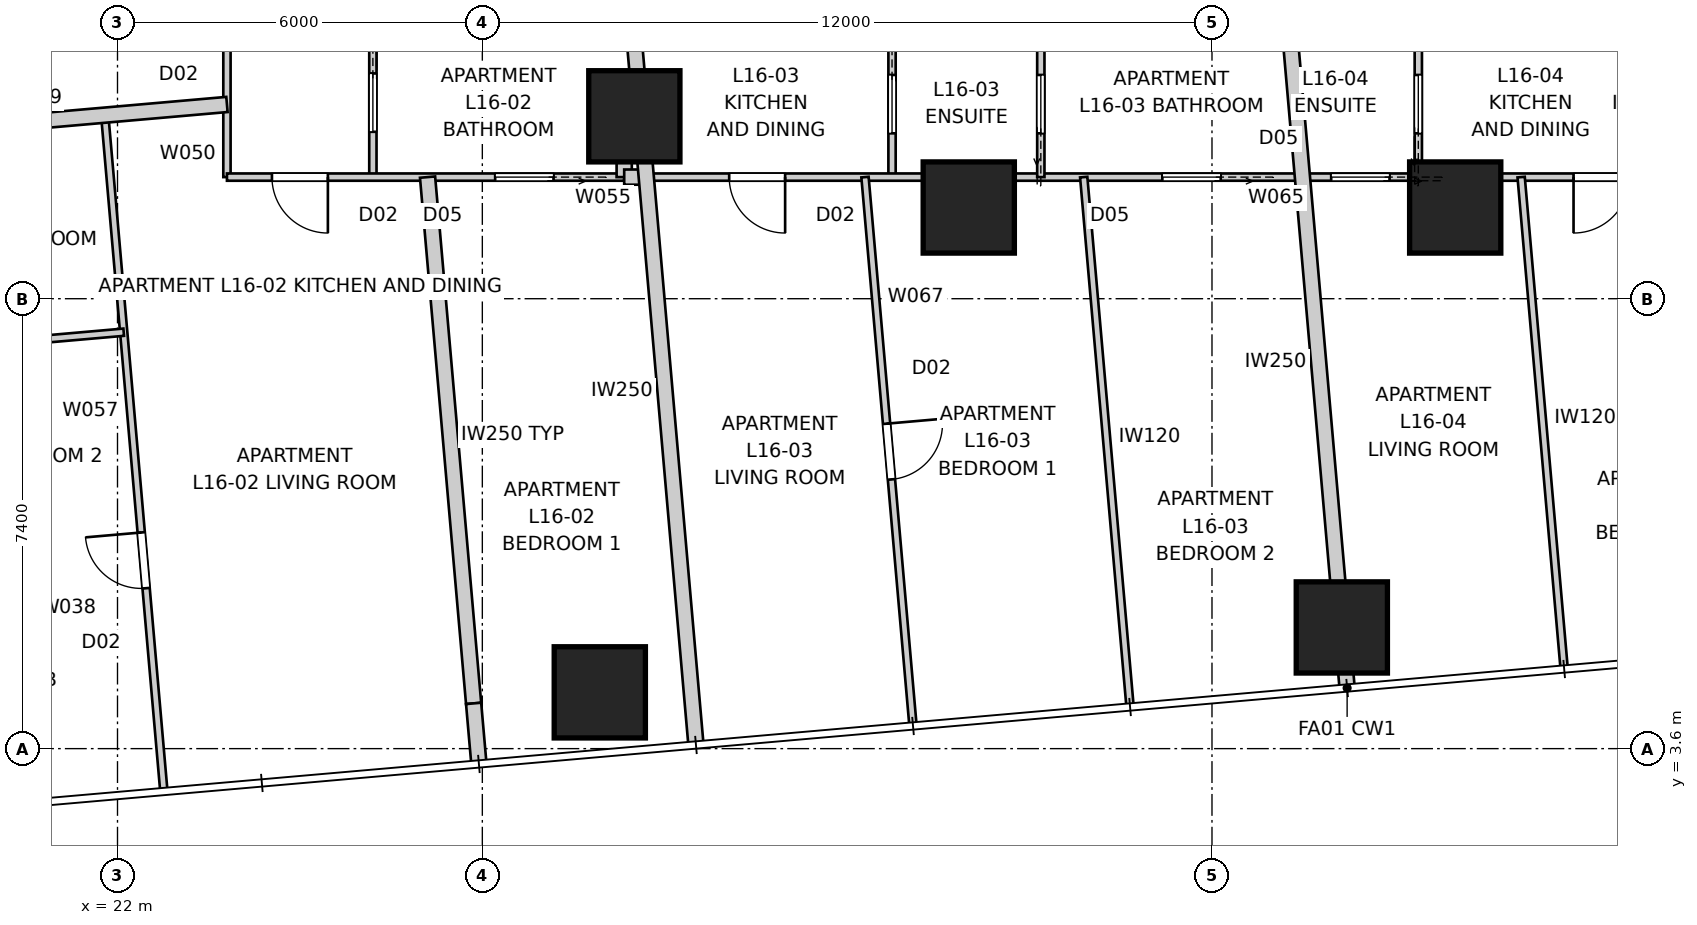
"""IFC4 building model, lengths in metres.
Left out: names, types, materials, properties, quantities, classifications, styles, units other than length and angle.
Written with IfcOpenShell. Run it as: python <this file> out.ifc"""

import sys

from ifc_helpers import new_model, si_unit, direction, frame, frame_2d, origin, origin_2d, place, context, subcontext, project, spatial, rectangle, extrude, element, fill, save


model = new_model("IFC4")
c1 = context("Model", 3, precision=1e-05, world=origin(), true_north=direction((0.0, 1.0)))
c2 = subcontext(c1, "Body", "Model", "MODEL_VIEW")
j1 = project(units=[si_unit("LENGTHUNIT", "METRE"), si_unit("PLANEANGLEUNIT", "RADIAN")], contexts=[c1])
p1 = place(None, origin())
s1 = spatial("IfcSite", under=j1, at=p1, CompositionType="ELEMENT")
p2 = place(p1, origin())
s2 = spatial("IfcBuilding", under=s1, at=p2, CompositionType="ELEMENT")
p3 = place(p2, frame((0.0, 0.0, 60.8)))
s3 = spatial("IfcBuildingStorey", under=s2, at=p3, CompositionType="ELEMENT", Elevation=60.8)
for number, where, z_axis, x_axis in (
    (1, (29.932, 4.526, 0.0), (0.0, 0.0, 1.0), (1.0, 0.0, 0.0)),
    (2, (42.135, 5.593, 0.0), (0.0, 0.0, 1.0), (1.0, 0.0, 0.0)),
    (3, (30.5, 14.0, 0.0), (0.0, 0.0, 1.0), (1.0, 0.0, 0.0)),
    (4, (36.0, 12.5, 0.0), (0.0, 0.0, 1.0), (1.0, 0.0, 0.0)),
    (5, (44.0, 12.5, 0.0), (0.0, 0.0, 1.0), (1.0, 0.0, 0.0)),
):
    element("IfcColumn", number, at=place(p3, frame(where, z_axis=z_axis, x_axis=x_axis)), inside=s3, PredefinedType="COLUMN", context=c2, shape_type="SweptSolid", body=[
        extrude(rectangle(XDim=1.5, YDim=1.5, at=origin_2d()), origin(), (0.0, 0.0, 1.0), 3.4),
    ])
p4 = place(p3, frame((42.222, 4.597, 0.0), z_axis=(0.0, 0.0, 1.0), x_axis=(-0.087140211333, 0.996196056792, 0.0)))
e6 = element("IfcWall", 6, at=p4, inside=s3, PredefinedType="PARTITIONING", context=c2, shape_type="SweptSolid", body=[
    extrude(rectangle(XDim=10.873, YDim=0.25, at=frame_2d((5.437, 0.0))), origin(), (0.0, 0.0, 1.0), 3.25),
])
p5 = place(p3, frame((31.513, 3.66, 0.0), z_axis=(0.0, 0.0, 1.0), x_axis=(-0.087168232078, 0.996193605338, 0.0)))
e7 = element("IfcWall", 7, at=p5, inside=s3, PredefinedType="PARTITIONING", context=c2, shape_type="SweptSolid", body=[
    extrude(rectangle(XDim=11.814, YDim=0.25, at=frame_2d((5.907, 0.0))), origin(), (0.0, 0.0, 1.0), 3.25),
])
p6 = place(p3, frame((23.8, 13.0, 0.0), z_axis=(0.0, 0.0, 1.0), x_axis=(0.0, 1.0, 0.0)))
e8 = element("IfcWall", 8, at=p6, inside=s3, PredefinedType="PARTITIONING", context=c2, shape_type="SweptSolid", body=[
    extrude(rectangle(XDim=8.439, YDim=0.12, at=frame_2d((4.219, 0.0))), origin(), (0.0, 0.0, 1.0), 2.55),
])
p7 = place(p6, frame((2.508, 0.0, 0.0)))
e9 = element("IfcOpeningElement", 9, at=p7, cuts=e8, PredefinedType="OPENING", context=c2, shape_type="SweptSolid", body=[
    extrude(rectangle(XDim=0.92, YDim=2.34, at=frame_2d((0.46, 1.17))), frame((0.0, 0.07, 0.0), z_axis=(0.0, -1.0, 0.0), x_axis=(1.0, 0.0, 0.0)), (0.0, 0.0, 1.0), 0.14),
])
p8 = place(p6, frame((5.685, 0.0, 0.0)))
e10 = element("IfcOpeningElement", 10, at=p8, cuts=e8, PredefinedType="OPENING", context=c2, shape_type="SweptSolid", body=[
    extrude(rectangle(XDim=0.96, YDim=2.1, at=frame_2d((0.48, 1.05))), frame((0.0, 0.07, 0.0), z_axis=(0.0, -1.0, 0.0), x_axis=(1.0, 0.0, 0.0)), (0.0, 0.0, 1.0), 0.14),
])
p9 = place(p3, frame((26.2, 15.45, 0.0), z_axis=(0.0, 0.0, 1.0), x_axis=(0.0, -1.0, 0.0)))
e11 = element("IfcWall", 11, at=p9, inside=s3, PredefinedType="PARTITIONING", context=c2, shape_type="SweptSolid", body=[
    extrude(rectangle(XDim=2.45, YDim=0.12, at=frame_2d((1.225, 0.0))), origin(), (0.0, 0.0, 1.0), 3.25),
])
p10 = place(p9, frame((0.745, 0.0, 0.0)))
e12 = element("IfcOpeningElement", 12, at=p10, cuts=e11, PredefinedType="OPENING", context=c2, shape_type="SweptSolid", body=[
    extrude(rectangle(XDim=0.96, YDim=2.1, at=frame_2d((0.48, 1.05))), frame((0.0, 0.07, 0.0), z_axis=(0.0, -1.0, 0.0), x_axis=(1.0, 0.0, 0.0)), (0.0, 0.0, 1.0), 0.14),
])
p11 = place(p3, frame((30.333, 13.0, 0.0), z_axis=(0.0, 0.0, 1.0), x_axis=(-1.0, 0.0, 0.0)))
e13 = element("IfcWall", 13, at=p11, inside=s3, PredefinedType="PARTITIONING", context=c2, shape_type="SweptSolid", body=[
    extrude(rectangle(XDim=6.533, YDim=0.12, at=frame_2d((3.267, 0.0))), origin(), (0.0, 0.0, 1.0), 3.25),
])
p12 = place(p11, frame((4.873, 0.0, 0.0)))
e14 = element("IfcOpeningElement", 14, at=p12, cuts=e13, PredefinedType="OPENING", context=c2, shape_type="SweptSolid", body=[
    extrude(rectangle(XDim=0.92, YDim=2.34, at=frame_2d((0.46, 1.17))), frame((0.0, 0.07, 0.0), z_axis=(0.0, -1.0, 0.0), x_axis=(1.0, 0.0, 0.0)), (0.0, 0.0, 1.0), 0.14),
])
p13 = place(p11, frame((1.162, 0.0, 0.0)))
e15 = element("IfcOpeningElement", 15, at=p13, cuts=e13, PredefinedType="OPENING", context=c2, shape_type="SweptSolid", body=[
    extrude(rectangle(XDim=0.96, YDim=2.1, at=frame_2d((0.48, 1.05))), frame((0.0, 0.07, 0.0), z_axis=(0.0, -1.0, 0.0), x_axis=(1.0, 0.0, 0.0)), (0.0, 0.0, 1.0), 0.14),
])
p14 = place(p3, frame((30.333, 14.396, 0.0), z_axis=(0.0, 0.0, 1.0), x_axis=(0.0, -1.0, 0.0)))
e16 = element("IfcWall", 16, at=p14, inside=s3, PredefinedType="PARTITIONING", context=c2, shape_type="SweptSolid", body=[
    extrude(rectangle(XDim=1.396, YDim=0.25, at=frame_2d((0.698, 0.0))), origin(), (0.0, 0.0, 1.0), 3.25),
])
p15 = place(p3, frame((22.759, 2.934, 0.0), z_axis=(0.0, 0.0, 1.0), x_axis=(-0.087130477128, 0.996196908224, 0.0)))
e17 = element("IfcWall", 17, at=p15, inside=s3, PredefinedType="PARTITIONING", context=c2, shape_type="SweptSolid", body=[
    extrude(rectangle(XDim=11.127, YDim=0.12, at=frame_2d((5.563, 0.0))), origin(), (0.0, 0.0, 1.0), 3.25),
])
p16 = place(p15, frame((3.317, 0.0, 0.0)))
e18 = element("IfcOpeningElement", 18, at=p16, cuts=e17, PredefinedType="OPENING", context=c2, shape_type="SweptSolid", body=[
    extrude(rectangle(XDim=0.92, YDim=2.34, at=frame_2d((0.46, 1.17))), frame((0.0, 0.07, 0.0), z_axis=(0.0, -1.0, 0.0), x_axis=(1.0, 0.0, 0.0)), (0.0, 0.0, 1.0), 0.14),
])
p17 = place(p3, frame((16.843, 13.586, 0.0), z_axis=(0.0, 0.0, 1.0), x_axis=(0.996195462691, 0.087147002895, 0.0)))
e19 = element("IfcWall", 19, at=p17, inside=s3, PredefinedType="PARTITIONING", context=c2, shape_type="SweptSolid", body=[
    extrude(rectangle(XDim=6.984, YDim=0.25, at=frame_2d((3.492, 0.0))), origin(), (0.0, 0.0, 1.0), 2.638),
])
p18 = place(p17, frame((1.548, 0.0, 0.0)))
e20 = element("IfcOpeningElement", 20, at=p18, cuts=e19, PredefinedType="OPENING", context=c2, shape_type="SweptSolid", body=[
    extrude(rectangle(XDim=0.92, YDim=2.34, at=frame_2d((0.46, 1.17))), frame((0.0, 0.135, 0.0), z_axis=(0.0, -1.0, 0.0), x_axis=(1.0, 0.0, 0.0)), (0.0, 0.0, 1.0), 0.27),
])
p19 = place(p3, frame((27.099, 13.0, 0.0), z_axis=(0.0, 0.0, 1.0), x_axis=(0.087158236544, -0.99619447991, 0.0)))
e21 = element("IfcWall", 21, at=p19, inside=s3, PredefinedType="PARTITIONING", context=c2, shape_type="SweptSolid", body=[
    extrude(rectangle(XDim=8.689, YDim=0.25, at=frame_2d((4.344, 0.0))), origin(), (0.0, 0.0, 1.0), 2.638),
])
p20 = place(p3, frame((27.856, 4.344, 0.0), z_axis=(0.0, 0.0, 1.0), x_axis=(0.087233202944, -0.996187918168, 0.0)))
e22 = element("IfcWall", 22, at=p20, inside=s3, PredefinedType="PARTITIONING", context=c2, shape_type="SweptSolid", body=[
    extrude(rectangle(XDim=0.96, YDim=0.25, at=frame_2d((0.48, 0.0))), origin(), (0.0, 0.0, 1.0), 3.25),
])
p21 = place(p3, frame((30.333, 13.0, 0.0), z_axis=(0.0, 0.0, 1.0), x_axis=(1.0, 0.0, 0.0)))
e23 = element("IfcWall", 23, at=p21, inside=s3, PredefinedType="PARTITIONING", context=c2, shape_type="SweptSolid", body=[
    extrude(rectangle(XDim=0.363, YDim=0.25, at=frame_2d((0.182, 0.0))), origin(), (0.0, 0.0, 1.0), 3.25),
])
p22 = place(p3, frame((16.198, 9.933, 0.0), z_axis=(0.0, 0.0, 1.0), x_axis=(0.996196712973, 0.08713270948, 0.0)))
e24 = element("IfcWall", 24, at=p22, inside=s3, PredefinedType="PARTITIONING", context=c2, shape_type="SweptSolid", body=[
    extrude(rectangle(XDim=5.926, YDim=0.12, at=frame_2d((2.963, 0.0))), origin(), (0.0, 0.0, 1.0), 3.25),
])
p23 = place(p3, frame((34.738, 15.4, 0.0), z_axis=(0.0, 0.0, 1.0), x_axis=(0.0, -1.0, 0.0)))
e25 = element("IfcWall", 25, at=p23, inside=s3, PredefinedType="PARTITIONING", context=c2, shape_type="SweptSolid", body=[
    extrude(rectangle(XDim=2.4, YDim=0.12, at=frame_2d((1.2, 0.0))), origin(), (0.0, 0.0, 1.0), 3.25),
])
p24 = place(p23, frame((0.72, 0.0, 0.0)))
e26 = element("IfcOpeningElement", 26, at=p24, cuts=e25, PredefinedType="OPENING", context=c2, shape_type="SweptSolid", body=[
    extrude(rectangle(XDim=0.96, YDim=2.1, at=frame_2d((0.48, 1.05))), frame((0.0, 0.07, 0.0), z_axis=(0.0, -1.0, 0.0), x_axis=(1.0, 0.0, 0.0)), (0.0, 0.0, 1.0), 0.14),
])
p25 = place(p3, frame((47.778, 13.0, 0.0), z_axis=(0.0, 0.0, 1.0), x_axis=(-1.0, 0.0, 0.0)))
e27 = element("IfcWall", 27, at=p25, inside=s3, PredefinedType="PARTITIONING", context=c2, shape_type="SweptSolid", body=[
    extrude(rectangle(XDim=17.082, YDim=0.12, at=frame_2d((8.541, 0.0))), origin(), (0.0, 0.0, 1.0), 2.55),
])
p26 = place(p25, frame((0.912, 0.0, 0.0)))
e28 = element("IfcOpeningElement", 28, at=p26, cuts=e27, PredefinedType="OPENING", context=c2, shape_type="SweptSolid", body=[
    extrude(rectangle(XDim=0.92, YDim=2.34, at=frame_2d((0.46, 1.17))), frame((0.0, 0.07, 0.0), z_axis=(0.0, -1.0, 0.0), x_axis=(1.0, 0.0, 0.0)), (0.0, 0.0, 1.0), 0.14),
])
p27 = place(p25, frame((14.798, 0.0, 0.0)))
e29 = element("IfcOpeningElement", 29, at=p27, cuts=e27, PredefinedType="OPENING", context=c2, shape_type="SweptSolid", body=[
    extrude(rectangle(XDim=0.92, YDim=2.34, at=frame_2d((0.46, 1.17))), frame((0.0, 0.07, 0.0), z_axis=(0.0, -1.0, 0.0), x_axis=(1.0, 0.0, 0.0)), (0.0, 0.0, 1.0), 0.14),
])
p28 = place(p25, frame((4.858, 0.0, 0.0)))
e30 = element("IfcOpeningElement", 30, at=p28, cuts=e27, PredefinedType="OPENING", context=c2, shape_type="SweptSolid", body=[
    extrude(rectangle(XDim=0.96, YDim=2.1, at=frame_2d((0.48, 1.05))), frame((0.0, 0.07, 0.0), z_axis=(0.0, -1.0, 0.0), x_axis=(1.0, 0.0, 0.0)), (0.0, 0.0, 1.0), 0.14),
])
p29 = place(p25, frame((7.635, 0.0, 0.0)))
e31 = element("IfcOpeningElement", 31, at=p29, cuts=e27, PredefinedType="OPENING", context=c2, shape_type="SweptSolid", body=[
    extrude(rectangle(XDim=0.96, YDim=2.1, at=frame_2d((0.48, 1.05))), frame((0.0, 0.07, 0.0), z_axis=(0.0, -1.0, 0.0), x_axis=(1.0, 0.0, 0.0)), (0.0, 0.0, 1.0), 0.14),
])
p30 = place(p3, frame((37.185, 13.0, 0.0), z_axis=(0.0, 0.0, 1.0), x_axis=(0.0, 1.0, 0.0)))
e32 = element("IfcWall", 32, at=p30, inside=s3, PredefinedType="PARTITIONING", context=c2, shape_type="SweptSolid", body=[
    extrude(rectangle(XDim=2.4, YDim=0.12, at=frame_2d((1.2, 0.0))), origin(), (0.0, 0.0, 1.0), 2.796),
])
p31 = place(p30, frame((0.72, 0.0, 0.0)))
e33 = element("IfcOpeningElement", 33, at=p31, cuts=e32, PredefinedType="OPENING", context=c2, shape_type="SweptSolid", body=[
    extrude(rectangle(XDim=0.96, YDim=2.1, at=frame_2d((0.48, 1.05))), frame((0.0, 0.07, 0.0), z_axis=(0.0, -1.0, 0.0), x_axis=(1.0, 0.0, 0.0)), (0.0, 0.0, 1.0), 0.14),
])
p32 = place(p3, frame((34.293, 13.0, 0.0), z_axis=(0.0, 0.0, 1.0), x_axis=(0.087160907995, -0.996194246178, 0.0)))
e34 = element("IfcWall", 34, at=p32, inside=s3, PredefinedType="PARTITIONING", context=c2, shape_type="SweptSolid", body=[
    extrude(rectangle(XDim=9.022, YDim=0.12, at=frame_2d((4.511, 0.0))), origin(), (0.0, 0.0, 1.0), 3.25),
])
p33 = place(p32, frame((4.071, 0.0, 0.0)))
e35 = element("IfcOpeningElement", 35, at=p33, cuts=e34, PredefinedType="OPENING", context=c2, shape_type="SweptSolid", body=[
    extrude(rectangle(XDim=0.92, YDim=2.34, at=frame_2d((0.46, 1.17))), frame((0.0, 0.07, 0.0), z_axis=(0.0, -1.0, 0.0), x_axis=(1.0, 0.0, 0.0)), (0.0, 0.0, 1.0), 0.14),
])
p34 = place(p3, frame((37.89, 13.0, 0.0), z_axis=(0.0, 0.0, 1.0), x_axis=(0.087158256162, -0.996194478193, 0.0)))
e36 = element("IfcWall", 36, at=p34, inside=s3, PredefinedType="PARTITIONING", context=c2, shape_type="SweptSolid", body=[
    extrude(rectangle(XDim=8.709, YDim=0.12, at=frame_2d((4.354, 0.0))), origin(), (0.0, 0.0, 1.0), 3.25),
])
p35 = place(p3, frame((43.393, 13.0, 0.0), z_axis=(0.0, 0.0, 1.0), x_axis=(0.0, 1.0, 0.0)))
e37 = element("IfcWall", 37, at=p35, inside=s3, PredefinedType="PARTITIONING", context=c2, shape_type="SweptSolid", body=[
    extrude(rectangle(XDim=2.4, YDim=0.12, at=frame_2d((1.2, 0.0))), origin(), (0.0, 0.0, 1.0), 3.25),
])
p36 = place(p35, frame((0.72, 0.0, 0.0)))
e38 = element("IfcOpeningElement", 38, at=p36, cuts=e37, PredefinedType="OPENING", context=c2, shape_type="SweptSolid", body=[
    extrude(rectangle(XDim=0.96, YDim=2.1, at=frame_2d((0.48, 1.05))), frame((0.0, 0.07, 0.0), z_axis=(0.0, -1.0, 0.0), x_axis=(1.0, 0.0, 0.0)), (0.0, 0.0, 1.0), 0.14),
])
p37 = place(p3, frame((45.084, 13.0, 0.0), z_axis=(0.0, 0.0, 1.0), x_axis=(0.087184938313, -0.99619214338, 0.0)))
e39 = element("IfcWall", 39, at=p37, inside=s3, PredefinedType="PARTITIONING", context=c2, shape_type="SweptSolid", body=[
    extrude(rectangle(XDim=8.082, YDim=0.12, at=frame_2d((4.041, 0.0))), origin(), (0.0, 0.0, 1.0), 3.25),
])
p38 = place(p26, origin())
e40 = element("IfcDoor", 40, at=p38, inside=s3, OperationType="SINGLE_SWING_RIGHT", PredefinedType="DOOR", context=c2, shape_type="SweptSolid", body=[
    extrude(rectangle(XDim=0.92, YDim=2.34, at=frame_2d((0.46, 1.17))), frame((0.0, 0.025, 0.0), z_axis=(0.0, -1.0, 0.0), x_axis=(1.0, 0.0, 0.0)), (0.0, 0.0, 1.0), 0.05),
])
fill(e28, e40)
p39 = place(p36, origin())
e41 = element("IfcDoor", 41, at=p39, inside=s3, OperationType="SLIDING_TO_LEFT", PredefinedType="DOOR", context=c2, shape_type="SweptSolid", body=[
    extrude(rectangle(XDim=0.96, YDim=2.1, at=frame_2d((0.48, 1.05))), frame((0.0, 0.025, 0.0), z_axis=(0.0, -1.0, 0.0), x_axis=(1.0, 0.0, 0.0)), (0.0, 0.0, 1.0), 0.05),
])
fill(e38, e41)
p40 = place(p27, origin())
e42 = element("IfcDoor", 42, at=p40, inside=s3, OperationType="SINGLE_SWING_LEFT", PredefinedType="DOOR", context=c2, shape_type="SweptSolid", body=[
    extrude(rectangle(XDim=0.92, YDim=2.34, at=frame_2d((0.46, 1.17))), frame((0.0, 0.025, 0.0), z_axis=(0.0, -1.0, 0.0), x_axis=(1.0, 0.0, 0.0)), (0.0, 0.0, 1.0), 0.05),
])
fill(e29, e42)
p41 = place(p24, origin())
e43 = element("IfcDoor", 43, at=p41, inside=s3, OperationType="SLIDING_TO_LEFT", PredefinedType="DOOR", context=c2, shape_type="SweptSolid", body=[
    extrude(rectangle(XDim=0.96, YDim=2.1, at=frame_2d((0.48, 1.05))), frame((0.0, 0.025, 0.0), z_axis=(0.0, -1.0, 0.0), x_axis=(1.0, 0.0, 0.0)), (0.0, 0.0, 1.0), 0.05),
])
fill(e26, e43)
p42 = place(p10, origin())
e44 = element("IfcDoor", 44, at=p42, inside=s3, OperationType="SLIDING_TO_LEFT", PredefinedType="DOOR", context=c2, shape_type="SweptSolid", body=[
    extrude(rectangle(XDim=0.96, YDim=2.1, at=frame_2d((0.48, 1.05))), frame((0.0, 0.025, 0.0), z_axis=(0.0, -1.0, 0.0), x_axis=(1.0, 0.0, 0.0)), (0.0, 0.0, 1.0), 0.05),
])
fill(e12, e44)
p43 = place(p12, origin())
e45 = element("IfcDoor", 45, at=p43, inside=s3, OperationType="SINGLE_SWING_LEFT", PredefinedType="DOOR", context=c2, shape_type="SweptSolid", body=[
    extrude(rectangle(XDim=0.92, YDim=2.34, at=frame_2d((0.46, 1.17))), frame((0.0, 0.025, 0.0), z_axis=(0.0, -1.0, 0.0), x_axis=(1.0, 0.0, 0.0)), (0.0, 0.0, 1.0), 0.05),
])
fill(e14, e45)
p44 = place(p28, origin())
e46 = element("IfcDoor", 46, at=p44, inside=s3, OperationType="SLIDING_TO_LEFT", PredefinedType="DOOR", context=c2, shape_type="SweptSolid", body=[
    extrude(rectangle(XDim=0.96, YDim=2.1, at=frame_2d((0.48, 1.05))), frame((0.0, 0.025, 0.0), z_axis=(0.0, -1.0, 0.0), x_axis=(1.0, 0.0, 0.0)), (0.0, 0.0, 1.0), 0.05),
])
fill(e30, e46)
p45 = place(p33, origin())
e47 = element("IfcDoor", 47, at=p45, inside=s3, OperationType="SINGLE_SWING_LEFT", PredefinedType="DOOR", context=c2, shape_type="SweptSolid", body=[
    extrude(rectangle(XDim=0.92, YDim=2.34, at=frame_2d((0.46, 1.17))), frame((0.0, 0.025, 0.0), z_axis=(0.0, -1.0, 0.0), x_axis=(1.0, 0.0, 0.0)), (0.0, 0.0, 1.0), 0.05),
])
fill(e35, e47)
p46 = place(p31, origin())
e48 = element("IfcDoor", 48, at=p46, inside=s3, OperationType="SLIDING_TO_LEFT", PredefinedType="DOOR", context=c2, shape_type="SweptSolid", body=[
    extrude(rectangle(XDim=0.96, YDim=2.1, at=frame_2d((0.48, 1.05))), frame((0.0, 0.025, 0.0), z_axis=(0.0, -1.0, 0.0), x_axis=(1.0, 0.0, 0.0)), (0.0, 0.0, 1.0), 0.05),
])
fill(e33, e48)
p47 = place(p13, origin())
e49 = element("IfcDoor", 49, at=p47, inside=s3, OperationType="SLIDING_TO_LEFT", PredefinedType="DOOR", context=c2, shape_type="SweptSolid", body=[
    extrude(rectangle(XDim=0.96, YDim=2.1, at=frame_2d((0.48, 1.05))), frame((0.0, 0.025, 0.0), z_axis=(0.0, -1.0, 0.0), x_axis=(1.0, 0.0, 0.0)), (0.0, 0.0, 1.0), 0.05),
])
fill(e15, e49)
p48 = place(p16, origin())
e50 = element("IfcDoor", 50, at=p48, inside=s3, OperationType="SINGLE_SWING_RIGHT", PredefinedType="DOOR", context=c2, shape_type="SweptSolid", body=[
    extrude(rectangle(XDim=0.92, YDim=2.34, at=frame_2d((0.46, 1.17))), frame((0.0, 0.025, 0.0), z_axis=(0.0, -1.0, 0.0), x_axis=(1.0, 0.0, 0.0)), (0.0, 0.0, 1.0), 0.05),
])
fill(e18, e50)
p49 = place(p29, origin())
e51 = element("IfcDoor", 51, at=p49, inside=s3, OperationType="SLIDING_TO_LEFT", PredefinedType="DOOR", context=c2, shape_type="SweptSolid", body=[
    extrude(rectangle(XDim=0.96, YDim=2.1, at=frame_2d((0.48, 1.05))), frame((0.0, 0.025, 0.0), z_axis=(0.0, -1.0, 0.0), x_axis=(1.0, 0.0, 0.0)), (0.0, 0.0, 1.0), 0.05),
])
fill(e31, e51)
save(model, sys.argv[1])
